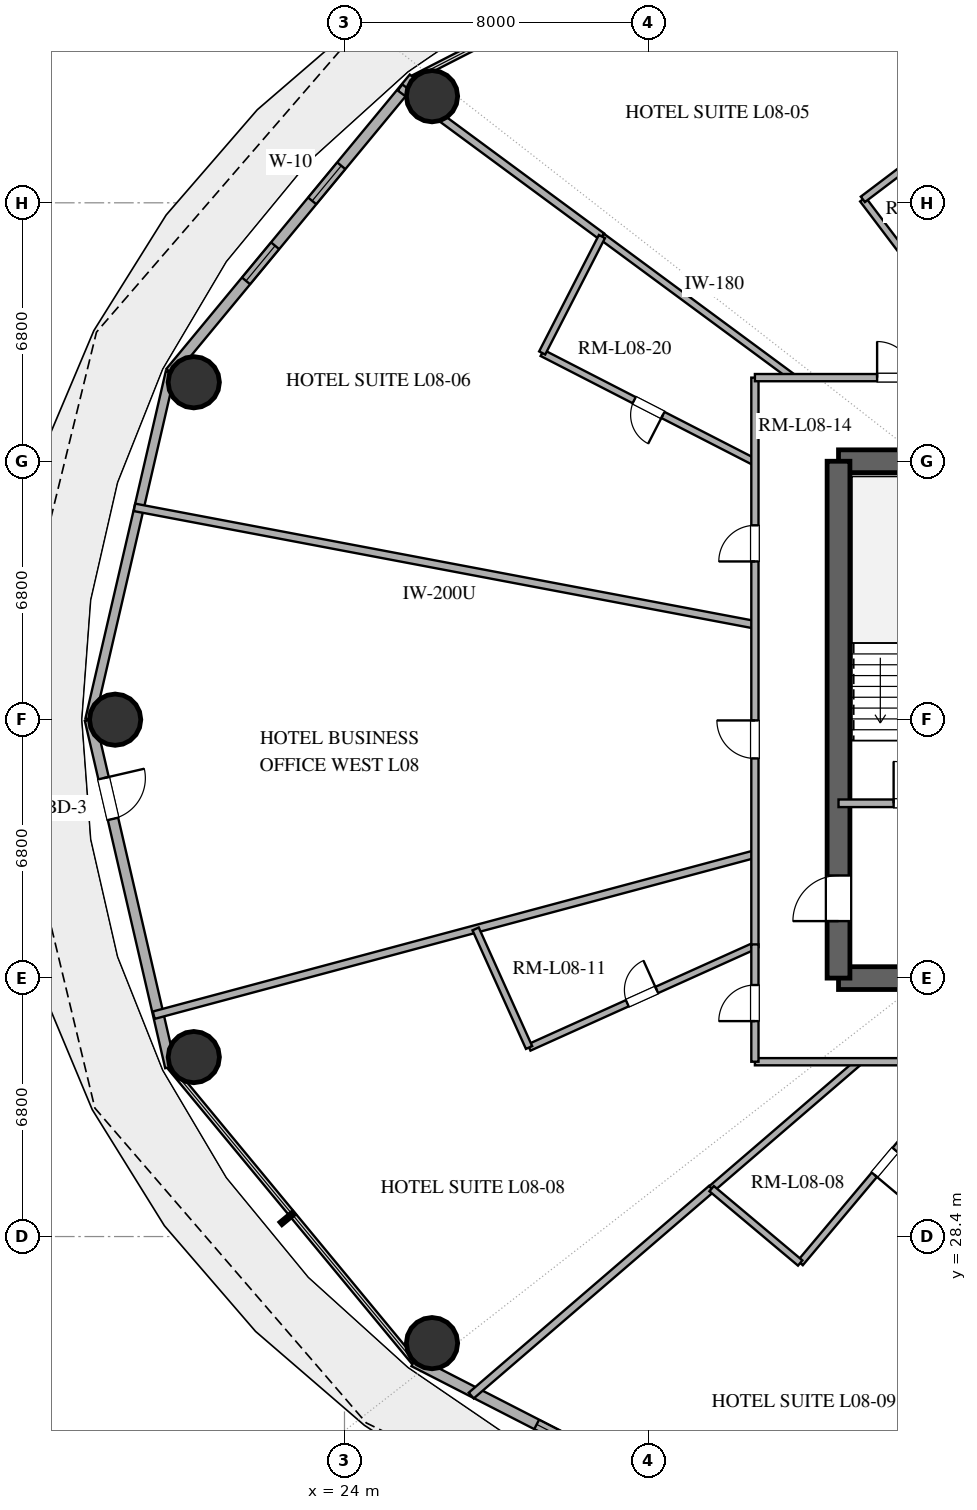
"""IFC4 building model, lengths in metres.
Left out: names, types, materials, properties, quantities, classifications, styles, units other than length and angle.
Written with IfcOpenShell. Run it as: python <this file> out.ifc"""

import sys

from ifc_helpers import new_model, si_unit, direction, frame, frame_2d, origin, origin_2d, place, context, subcontext, project, spatial, rectangle, hollow_circle, extrude, element, fill, save


model = new_model("IFC4")
c1 = context("Model", 3, precision=1e-05, world=origin(), true_north=direction((0.0, 1.0)))
c2 = subcontext(c1, "Body", "Model", "MODEL_VIEW")
j1 = project(units=[si_unit("LENGTHUNIT", "METRE"), si_unit("PLANEANGLEUNIT", "RADIAN")], contexts=[c1])
p1 = place(None, origin())
s1 = spatial("IfcSite", under=j1, at=p1, CompositionType="ELEMENT")
p2 = place(p1, origin())
s2 = spatial("IfcBuilding", under=s1, at=p2, CompositionType="ELEMENT")
p3 = place(p2, frame((0.0, 0.0, 39.0)))
s3 = spatial("IfcBuildingStorey", under=s2, at=p3, CompositionType="ELEMENT", Elevation=39.0)
for number, where, z_axis, x_axis in (
    (1, (37.0, 35.2, 0.0), (0.0, 0.0, 1.0), (1.0, 0.0, 0.0)),
    (2, (37.0, 48.8, 0.0), (0.0, 0.0, 1.0), (1.0, 0.0, 0.0)),
):
    element("IfcWall", number, at=place(p3, frame(where, z_axis=z_axis, x_axis=x_axis)), inside=s3, PredefinedType="SHEAR", context=c2, shape_type="SweptSolid", body=[
        extrude(rectangle(XDim=4.0, YDim=0.6, at=frame_2d((2.0, 0.0))), origin(), (0.0, 0.0, 1.0), 3.38),
    ])
p4 = place(p3, frame((37.0, 35.2, 0.0), z_axis=(0.0, 0.0, 1.0), x_axis=(0.0, 1.0, 0.0)))
e3 = element("IfcWall", 3, at=p4, inside=s3, PredefinedType="SHEAR", context=c2, shape_type="SweptSolid", body=[
    extrude(rectangle(XDim=13.6, YDim=0.6, at=frame_2d((6.8, 0.0))), origin(), (0.0, 0.0, 1.0), 3.38),
])
p5 = place(p4, frame((1.5, 0.0, 0.0)))
e4 = element("IfcOpeningElement", 4, at=p5, cuts=e3, PredefinedType="OPENING", context=c2, shape_type="SweptSolid", body=[
    extrude(rectangle(XDim=1.2, YDim=2.15, at=frame_2d((0.6, 1.075))), frame((0.0, 0.31, 0.0), z_axis=(0.0, -1.0, 0.0), x_axis=(1.0, 0.0, 0.0)), (0.0, 0.0, 1.0), 0.62),
])
for number, where, z_axis, x_axis in (
    (5, (26.303, 58.405, 0.0), (0.0, 0.0, 1.0), (1.0, 0.0, 0.0)),
    (6, (20.034, 50.878, 0.0), (0.0, 0.0, 1.0), (1.0, 0.0, 0.0)),
    (7, (17.965, 42.0, 0.0), (0.0, 0.0, 1.0), (1.0, 0.0, 0.0)),
    (8, (20.034, 33.122, 0.0), (0.0, 0.0, 1.0), (1.0, 0.0, 0.0)),
    (9, (26.303, 25.595, 0.0), (0.0, 0.0, 1.0), (1.0, 0.0, 0.0)),
):
    element("IfcColumn", number, at=place(p3, frame(where, z_axis=z_axis, x_axis=x_axis)), inside=s3, PredefinedType="COLUMN", context=c2, shape_type="SweptSolid", body=[
        extrude(hollow_circle(Radius=0.675, WallThickness=0.036, at=origin_2d()), origin(), (0.0, 0.0, 1.0), 3.38),
    ])
p6 = place(p3, frame((25.826, 58.886, 0.0), z_axis=(0.0, 0.0, 1.0), x_axis=(-0.637296809613, -0.770618437657, 0.0)))
e10 = element("IfcWall", 10, at=p6, inside=s3, PredefinedType="SOLIDWALL", context=c2, shape_type="SweptSolid", body=[
    extrude(rectangle(XDim=10.053, YDim=0.28, at=frame_2d((5.027, 0.0))), origin(), (0.0, 0.0, 1.0), 3.38),
])
p7 = place(p6, frame((2.998, 0.0, 0.85)))
e11 = element("IfcOpeningElement", 11, at=p7, cuts=e10, PredefinedType="OPENING", context=c2, shape_type="SweptSolid", body=[
    extrude(rectangle(XDim=1.2, YDim=1.6, at=frame_2d((0.6, 0.8))), frame((0.0, 0.15, 0.0), z_axis=(0.0, -1.0, 0.0), x_axis=(1.0, 0.0, 0.0)), (0.0, 0.0, 1.0), 0.3),
])
p8 = place(p6, frame((5.73, 0.0, 0.85)))
e12 = element("IfcOpeningElement", 12, at=p8, cuts=e10, PredefinedType="OPENING", context=c2, shape_type="SweptSolid", body=[
    extrude(rectangle(XDim=1.2, YDim=1.6, at=frame_2d((0.6, 0.8))), frame((0.0, 0.15, 0.0), z_axis=(0.0, -1.0, 0.0), x_axis=(1.0, 0.0, 0.0)), (0.0, 0.0, 1.0), 0.3),
])
p9 = place(p3, frame((19.419, 51.138, 0.0), z_axis=(0.0, 0.0, 1.0), x_axis=(-0.225454452941, -0.974253709076, 0.0)))
e13 = element("IfcWall", 13, at=p9, inside=s3, PredefinedType="SOLIDWALL", context=c2, shape_type="SweptSolid", body=[
    extrude(rectangle(XDim=9.38, YDim=0.25, at=frame_2d((4.69, 0.0))), origin(), (0.0, 0.0, 1.0), 3.38),
])
p10 = place(p3, frame((17.304, 42.0, 0.0), z_axis=(0.0, 0.0, 1.0), x_axis=(0.225454452941, -0.974253709076, 0.0)))
e14 = element("IfcWall", 14, at=p10, inside=s3, PredefinedType="SOLIDWALL", context=c2, shape_type="SweptSolid", body=[
    extrude(rectangle(XDim=9.38, YDim=0.28, at=frame_2d((4.69, 0.0))), origin(), (0.0, 0.0, 1.0), 3.38),
])
p11 = place(p10, frame((1.579, 0.0, 0.0)))
e15 = element("IfcOpeningElement", 15, at=p11, cuts=e14, PredefinedType="OPENING", context=c2, shape_type="SweptSolid", body=[
    extrude(rectangle(XDim=1.1, YDim=2.25, at=frame_2d((0.55, 1.125))), frame((0.0, 0.15, 0.0), z_axis=(0.0, -1.0, 0.0), x_axis=(1.0, 0.0, 0.0)), (0.0, 0.0, 1.0), 0.3),
])
p12 = place(p3, frame((25.826, 25.114, 0.0), z_axis=(0.0, 0.0, 1.0), x_axis=(0.889853976658, -0.456245438581, 0.0)))
e16 = element("IfcWall", 16, at=p12, inside=s3, PredefinedType="SOLIDWALL", context=c2, shape_type="SweptSolid", body=[
    extrude(rectangle(XDim=11.346, YDim=0.28, at=frame_2d((5.673, 0.0))), origin(), (0.0, 0.0, 1.0), 3.38),
])
p13 = place(p12, frame((3.632, 0.0, 0.85)))
e17 = element("IfcOpeningElement", 17, at=p13, cuts=e16, PredefinedType="OPENING", context=c2, shape_type="SweptSolid", body=[
    extrude(rectangle(XDim=1.5, YDim=2.0, at=frame_2d((0.75, 1.0))), frame((0.0, 0.15, 0.0), z_axis=(0.0, -1.0, 0.0), x_axis=(1.0, 0.0, 0.0)), (0.0, 0.0, 1.0), 0.3),
])
p14 = place(p12, frame((6.761, 0.0, 0.85)))
e18 = element("IfcOpeningElement", 18, at=p14, cuts=e16, PredefinedType="OPENING", context=c2, shape_type="SweptSolid", body=[
    extrude(rectangle(XDim=1.5, YDim=2.0, at=frame_2d((0.75, 1.0))), frame((0.0, 0.15, 0.0), z_axis=(0.0, -1.0, 0.0), x_axis=(1.0, 0.0, 0.0)), (0.0, 0.0, 1.0), 0.3),
])
p15 = place(p3, frame((37.0, 39.8, 0.0), z_axis=(0.0, 0.0, 1.0), x_axis=(1.0, 0.0, 0.0)))
e19 = element("IfcWall", 19, at=p15, inside=s3, PredefinedType="SOLIDWALL", context=c2, shape_type="SweptSolid", body=[
    extrude(rectangle(XDim=4.0, YDim=0.2, at=frame_2d((2.0, 0.0))), origin(), (0.0, 0.0, 1.0), 2.74),
])
p16 = place(p15, frame((1.45, 0.0, 0.0)))
e20 = element("IfcOpeningElement", 20, at=p16, cuts=e19, PredefinedType="OPENING", context=c2, shape_type="SweptSolid", body=[
    extrude(rectangle(XDim=1.1, YDim=2.15, at=frame_2d((0.55, 1.075))), frame((0.0, 0.11, 0.0), z_axis=(0.0, -1.0, 0.0), x_axis=(1.0, 0.0, 0.0)), (0.0, 0.0, 1.0), 0.22),
])
p17 = place(p3, frame((34.8, 44.498, 0.0), z_axis=(0.0, 0.0, 1.0), x_axis=(-0.982565603173, 0.185916205484, 0.0)))
e21 = element("IfcWall", 21, at=p17, inside=s3, PredefinedType="PARTITIONING", context=c2, shape_type="SweptSolid", body=[
    extrude(rectangle(XDim=16.616, YDim=0.2, at=frame_2d((8.308, 0.0))), origin(), (0.0, 0.0, 1.0), 2.74),
])
p18 = place(p3, frame((34.8, 38.463, 0.0), z_axis=(0.0, 0.0, 1.0), x_axis=(-0.965922233104, -0.258832454679, 0.0)))
e22 = element("IfcWall", 22, at=p18, inside=s3, PredefinedType="PARTITIONING", context=c2, shape_type="SweptSolid", body=[
    extrude(rectangle(XDim=16.377, YDim=0.2, at=frame_2d((8.189, 0.0))), origin(), (0.0, 0.0, 1.0), 2.74),
])
p19 = place(p3, frame((27.334, 24.216, 0.0), z_axis=(0.0, 0.0, 1.0), x_axis=(0.757966817992, 0.652293111127, 0.0)))
e23 = element("IfcWall", 23, at=p19, inside=s3, PredefinedType="PARTITIONING", context=c2, shape_type="SweptSolid", body=[
    extrude(rectangle(XDim=8.347, YDim=0.2, at=frame_2d((4.174, 0.0))), origin(), (0.0, 0.0, 1.0), 2.74),
])
p20 = place(p3, frame((44.073, 33.0, 0.0), z_axis=(0.0, 0.0, 1.0), x_axis=(-0.399884283786, -0.916565632991, 0.0)))
e24 = element("IfcWall", 24, at=p20, inside=s3, PredefinedType="PARTITIONING", context=c2, shape_type="SweptSolid", body=[
    extrude(rectangle(XDim=14.749, YDim=0.2, at=frame_2d((7.375, 0.0))), origin(), (0.0, 0.0, 1.0), 2.74),
])
p21 = place(p3, frame((43.243, 51.0, 0.0), z_axis=(0.0, 0.0, 1.0), x_axis=(-0.467270516294, 0.884114395654, 0.0)))
e25 = element("IfcWall", 25, at=p21, inside=s3, PredefinedType="PARTITIONING", context=c2, shape_type="SweptSolid", body=[
    extrude(rectangle(XDim=14.96, YDim=0.2, at=frame_2d((7.48, 0.0))), origin(), (0.0, 0.0, 1.0), 2.74),
])
p22 = place(p3, frame((40.44, 33.0, 0.0), z_axis=(0.0, 0.0, 1.0), x_axis=(-0.643154836645, -0.765736153058, 0.0)))
e26 = element("IfcWall", 26, at=p22, inside=s3, PredefinedType="PLUMBINGWALL", context=c2, shape_type="SweptSolid", body=[
    extrude(rectangle(XDim=6.917, YDim=0.18, at=frame_2d((3.458, 0.0))), origin(), (0.0, 0.0, 1.0), 2.74),
])
p23 = place(p22, frame((3.034, 0.0, 0.0)))
e27 = element("IfcOpeningElement", 27, at=p23, cuts=e26, PredefinedType="OPENING", context=c2, shape_type="SweptSolid", body=[
    extrude(rectangle(XDim=0.85, YDim=2.1, at=frame_2d((0.425, 1.05))), frame((0.0, 0.1, 0.0), z_axis=(0.0, -1.0, 0.0), x_axis=(1.0, 0.0, 0.0)), (0.0, 0.0, 1.0), 0.2),
])
p24 = place(p3, frame((25.462, 58.634, 0.0), z_axis=(0.0, 0.0, 1.0), x_axis=(0.804616980297, -0.593794168898, 0.0)))
e28 = element("IfcWall", 28, at=p24, inside=s3, PredefinedType="PARTITIONING", context=c2, shape_type="SweptSolid", body=[
    extrude(rectangle(XDim=6.603, YDim=0.2, at=frame_2d((3.302, 0.0))), origin(), (0.0, 0.0, 1.0), 2.74),
])
p25 = place(p3, frame((28.857, 33.374, 0.0), z_axis=(0.0, 0.0, 1.0), x_axis=(0.911702033518, 0.410852044025, 0.0)))
e29 = element("IfcWall", 29, at=p25, inside=s3, PredefinedType="PLUMBINGWALL", context=c2, shape_type="SweptSolid", body=[
    extrude(rectangle(XDim=6.519, YDim=0.18, at=frame_2d((3.259, 0.0))), origin(), (0.0, 0.0, 1.0), 2.74),
])
p26 = place(p25, frame((2.834, 0.0, 0.0)))
e30 = element("IfcOpeningElement", 30, at=p26, cuts=e29, PredefinedType="OPENING", context=c2, shape_type="SweptSolid", body=[
    extrude(rectangle(XDim=0.85, YDim=2.1, at=frame_2d((0.425, 1.05))), frame((0.0, 0.1, 0.0), z_axis=(0.0, -1.0, 0.0), x_axis=(1.0, 0.0, 0.0)), (0.0, 0.0, 1.0), 0.2),
])
p27 = place(p3, frame((34.8, 48.776, 0.0), z_axis=(0.0, 0.0, 1.0), x_axis=(-0.889651376734, 0.456640370395, 0.0)))
e31 = element("IfcWall", 31, at=p27, inside=s3, PredefinedType="PLUMBINGWALL", context=c2, shape_type="SweptSolid", body=[
    extrude(rectangle(XDim=6.292, YDim=0.18, at=frame_2d((3.146, 0.0))), origin(), (0.0, 0.0, 1.0), 2.74),
])
p28 = place(p27, frame((2.721, 0.0, 0.0)))
e32 = element("IfcOpeningElement", 32, at=p28, cuts=e31, PredefinedType="OPENING", context=c2, shape_type="SweptSolid", body=[
    extrude(rectangle(XDim=0.85, YDim=2.1, at=frame_2d((0.425, 1.05))), frame((0.0, 0.1, 0.0), z_axis=(0.0, -1.0, 0.0), x_axis=(1.0, 0.0, 0.0)), (0.0, 0.0, 1.0), 0.2),
])
p29 = place(p3, frame((30.775, 54.713, 0.0), z_axis=(0.0, 0.0, 1.0), x_axis=(0.804582519588, -0.593840861825, 0.0)))
e33 = element("IfcWall", 33, at=p29, inside=s3, PredefinedType="PLUMBINGWALL", context=c2, shape_type="SweptSolid", body=[
    extrude(rectangle(XDim=6.252, YDim=0.18, at=frame_2d((3.126, 0.0))), origin(), (0.0, 0.0, 1.0), 2.74),
])
p30 = place(p3, frame((34.8, 36.017, 0.0), z_axis=(0.0, 0.0, 1.0), x_axis=(0.0, 1.0, 0.0)))
e34 = element("IfcWall", 34, at=p30, inside=s3, PredefinedType="PARTITIONING", context=c2, shape_type="SweptSolid", body=[
    extrude(rectangle(XDim=14.983, YDim=0.19, at=frame_2d((7.492, 0.0))), origin(), (0.0, 0.0, 1.0), 2.74),
])
p31 = place(p30, frame((4.963, 0.0, 0.0)))
e35 = element("IfcOpeningElement", 35, at=p31, cuts=e34, PredefinedType="OPENING", context=c2, shape_type="SweptSolid", body=[
    extrude(rectangle(XDim=1.0, YDim=2.2, at=frame_2d((0.5, 1.1))), frame((0.0, 0.105, 0.0), z_axis=(0.0, -1.0, 0.0), x_axis=(1.0, 0.0, 0.0)), (0.0, 0.0, 1.0), 0.21),
])
p32 = place(p30, frame((10.146, 0.0, 0.0)))
e36 = element("IfcOpeningElement", 36, at=p32, cuts=e34, PredefinedType="OPENING", context=c2, shape_type="SweptSolid", body=[
    extrude(rectangle(XDim=0.95, YDim=2.15, at=frame_2d((0.475, 1.075))), frame((0.0, 0.105, 0.0), z_axis=(0.0, -1.0, 0.0), x_axis=(1.0, 0.0, 0.0)), (0.0, 0.0, 1.0), 0.21),
])
p33 = place(p3, frame((37.64, 55.691, 0.0), z_axis=(0.0, 0.0, 1.0), x_axis=(0.603401299207, -0.797437691682, 0.0)))
e37 = element("IfcWall", 37, at=p33, inside=s3, PredefinedType="PLUMBINGWALL", context=c2, shape_type="SweptSolid", body=[
    extrude(rectangle(XDim=5.882, YDim=0.18, at=frame_2d((2.941, 0.0))), origin(), (0.0, 0.0, 1.0), 2.74),
])
p34 = place(p33, frame((2.516, 0.0, 0.0)))
e38 = element("IfcOpeningElement", 38, at=p34, cuts=e37, PredefinedType="OPENING", context=c2, shape_type="SweptSolid", body=[
    extrude(rectangle(XDim=0.85, YDim=2.1, at=frame_2d((0.425, 1.05))), frame((0.0, 0.1, 0.0), z_axis=(0.0, -1.0, 0.0), x_axis=(1.0, 0.0, 0.0)), (0.0, 0.0, 1.0), 0.2),
])
p35 = place(p3, frame((34.8, 51.0, 0.0), z_axis=(0.0, 0.0, 1.0), x_axis=(1.0, 0.0, 0.0)))
e39 = element("IfcWall", 39, at=p35, inside=s3, PredefinedType="PARTITIONING", context=c2, shape_type="SweptSolid", body=[
    extrude(rectangle(XDim=8.479, YDim=0.19, at=frame_2d((4.24, 0.0))), origin(), (0.0, 0.0, 1.0), 2.74),
])
p36 = place(p35, frame((3.216, 0.0, 0.0)))
e40 = element("IfcOpeningElement", 40, at=p36, cuts=e39, PredefinedType="OPENING", context=c2, shape_type="SweptSolid", body=[
    extrude(rectangle(XDim=0.95, YDim=2.15, at=frame_2d((0.475, 1.075))), frame((0.0, 0.105, 0.0), z_axis=(0.0, -1.0, 0.0), x_axis=(1.0, 0.0, 0.0)), (0.0, 0.0, 1.0), 0.21),
])
p37 = place(p3, frame((33.661, 29.661, 0.0), z_axis=(0.0, 0.0, 1.0), x_axis=(0.757969199921, 0.652290343307, 0.0)))
e41 = element("IfcWall", 41, at=p37, inside=s3, PredefinedType="PLUMBINGWALL", context=c2, shape_type="SweptSolid", body=[
    extrude(rectangle(XDim=5.119, YDim=0.18, at=frame_2d((2.56, 0.0))), origin(), (0.0, 0.0, 1.0), 2.74),
])
p38 = place(p3, frame((44.108, 33.0, 0.0), z_axis=(0.0, 0.0, 1.0), x_axis=(-1.0, 0.0, 0.0)))
e42 = element("IfcWall", 42, at=p38, inside=s3, PredefinedType="PARTITIONING", context=c2, shape_type="SweptSolid", body=[
    extrude(rectangle(XDim=9.308, YDim=0.19, at=frame_2d((4.654, 0.0))), origin(), (0.0, 0.0, 1.0), 2.74),
])
p39 = place(p38, frame((1.38, 0.0, 0.0)))
e43 = element("IfcOpeningElement", 43, at=p39, cuts=e42, PredefinedType="OPENING", context=c2, shape_type="SweptSolid", body=[
    extrude(rectangle(XDim=0.95, YDim=2.15, at=frame_2d((0.475, 1.075))), frame((0.0, 0.105, 0.0), z_axis=(0.0, -1.0, 0.0), x_axis=(1.0, 0.0, 0.0)), (0.0, 0.0, 1.0), 0.21),
])
p40 = place(p3, frame((29.202, 51.649, 0.0), z_axis=(0.0, 0.0, 1.0), x_axis=(0.456659133546, 0.889641745732, 0.0)))
e44 = element("IfcWall", 44, at=p40, inside=s3, PredefinedType="PLUMBINGWALL", context=c2, shape_type="SweptSolid", body=[
    extrude(rectangle(XDim=3.444, YDim=0.18, at=frame_2d((1.722, 0.0))), origin(), (0.0, 0.0, 1.0), 2.74),
])
p41 = place(p3, frame((27.451, 36.494, 0.0), z_axis=(0.0, 0.0, 1.0), x_axis=(0.410839223928, -0.911707810695, 0.0)))
e45 = element("IfcWall", 45, at=p41, inside=s3, PredefinedType="PLUMBINGWALL", context=c2, shape_type="SweptSolid", body=[
    extrude(rectangle(XDim=3.422, YDim=0.18, at=frame_2d((1.711, 0.0))), origin(), (0.0, 0.0, 1.0), 2.74),
])
p42 = place(p3, frame((34.8, 33.0, 0.0), z_axis=(0.0, 0.0, 1.0), x_axis=(0.0, 1.0, 0.0)))
e46 = element("IfcWall", 46, at=p42, inside=s3, PredefinedType="PARTITIONING", context=c2, shape_type="SweptSolid", body=[
    extrude(rectangle(XDim=3.087, YDim=0.19, at=frame_2d((1.543, 0.0))), origin(), (0.0, 0.0, 1.0), 2.74),
])
p43 = place(p42, frame((1.069, 0.0, 0.0)))
e47 = element("IfcOpeningElement", 47, at=p43, cuts=e46, PredefinedType="OPENING", context=c2, shape_type="SweptSolid", body=[
    extrude(rectangle(XDim=0.95, YDim=2.15, at=frame_2d((0.475, 1.075))), frame((0.0, 0.105, 0.0), z_axis=(0.0, -1.0, 0.0), x_axis=(1.0, 0.0, 0.0)), (0.0, 0.0, 1.0), 0.21),
])
p44 = place(p3, frame((35.992, 27.703, 0.0), z_axis=(0.0, 0.0, 1.0), x_axis=(-0.765736471754, 0.643154457208, 0.0)))
e48 = element("IfcWall", 48, at=p44, inside=s3, PredefinedType="PLUMBINGWALL", context=c2, shape_type="SweptSolid", body=[
    extrude(rectangle(XDim=3.043, YDim=0.18, at=frame_2d((1.521, 0.0))), origin(), (0.0, 0.0, 1.0), 2.74),
])
p45 = place(p3, frame((39.872, 57.379, 0.0), z_axis=(0.0, 0.0, 1.0), x_axis=(-0.797438154909, -0.603400687019, 0.0)))
e49 = element("IfcWall", 49, at=p45, inside=s3, PredefinedType="PLUMBINGWALL", context=c2, shape_type="SweptSolid", body=[
    extrude(rectangle(XDim=2.798, YDim=0.18, at=frame_2d((1.399, 0.0))), origin(), (0.0, 0.0, 1.0), 2.74),
])
p46 = place(p7, origin())
e50 = element("IfcWindow", 50, at=p46, inside=s3, PartitioningType="SINGLE_PANEL", PredefinedType="WINDOW", context=c2, shape_type="SweptSolid", body=[
    extrude(rectangle(XDim=1.2, YDim=1.6, at=frame_2d((0.6, 0.8))), frame((0.0, 0.03, 0.0), z_axis=(0.0, -1.0, 0.0), x_axis=(1.0, 0.0, 0.0)), (0.0, 0.0, 1.0), 0.06),
])
fill(e11, e50)
p47 = place(p8, origin())
e51 = element("IfcWindow", 51, at=p47, inside=s3, PartitioningType="SINGLE_PANEL", PredefinedType="WINDOW", context=c2, shape_type="SweptSolid", body=[
    extrude(rectangle(XDim=1.2, YDim=1.6, at=frame_2d((0.6, 0.8))), frame((0.0, 0.03, 0.0), z_axis=(0.0, -1.0, 0.0), x_axis=(1.0, 0.0, 0.0)), (0.0, 0.0, 1.0), 0.06),
])
fill(e12, e51)
p48 = place(p11, origin())
e52 = element("IfcDoor", 52, at=p48, inside=s3, OperationType="SINGLE_SWING_LEFT", PredefinedType="DOOR", context=c2, shape_type="SweptSolid", body=[
    extrude(rectangle(XDim=1.1, YDim=2.25, at=frame_2d((0.55, 1.125))), frame((0.0, 0.025, 0.0), z_axis=(0.0, -1.0, 0.0), x_axis=(1.0, 0.0, 0.0)), (0.0, 0.0, 1.0), 0.05),
])
fill(e15, e52)
p49 = place(p13, origin())
e53 = element("IfcWindow", 53, at=p49, inside=s3, PartitioningType="SINGLE_PANEL", PredefinedType="WINDOW", context=c2, shape_type="SweptSolid", body=[
    extrude(rectangle(XDim=1.5, YDim=2.0, at=frame_2d((0.75, 1.0))), frame((0.0, 0.03, 0.0), z_axis=(0.0, -1.0, 0.0), x_axis=(1.0, 0.0, 0.0)), (0.0, 0.0, 1.0), 0.06),
])
fill(e17, e53)
p50 = place(p5, origin())
e54 = element("IfcDoor", 54, at=p50, inside=s3, OperationType="SINGLE_SWING_LEFT", PredefinedType="DOOR", context=c2, shape_type="SweptSolid", body=[
    extrude(rectangle(XDim=1.2, YDim=2.15, at=frame_2d((0.6, 1.075))), frame((0.0, 0.025, 0.0), z_axis=(0.0, -1.0, 0.0), x_axis=(1.0, 0.0, 0.0)), (0.0, 0.0, 1.0), 0.05),
])
fill(e4, e54)
p51 = place(p16, origin())
e55 = element("IfcDoor", 55, at=p51, inside=s3, OperationType="SINGLE_SWING_LEFT", PredefinedType="DOOR", context=c2, shape_type="SweptSolid", body=[
    extrude(rectangle(XDim=1.1, YDim=2.15, at=frame_2d((0.55, 1.075))), frame((0.0, 0.025, 0.0), z_axis=(0.0, -1.0, 0.0), x_axis=(1.0, 0.0, 0.0)), (0.0, 0.0, 1.0), 0.05),
])
fill(e20, e55)
p52 = place(p23, origin())
e56 = element("IfcDoor", 56, at=p52, inside=s3, OperationType="SINGLE_SWING_RIGHT", PredefinedType="DOOR", context=c2, shape_type="SweptSolid", body=[
    extrude(rectangle(XDim=0.85, YDim=2.1, at=frame_2d((0.425, 1.05))), frame((0.0, 0.025, 0.0), z_axis=(0.0, -1.0, 0.0), x_axis=(1.0, 0.0, 0.0)), (0.0, 0.0, 1.0), 0.05),
])
fill(e27, e56)
p53 = place(p26, origin())
e57 = element("IfcDoor", 57, at=p53, inside=s3, OperationType="SINGLE_SWING_RIGHT", PredefinedType="DOOR", context=c2, shape_type="SweptSolid", body=[
    extrude(rectangle(XDim=0.85, YDim=2.1, at=frame_2d((0.425, 1.05))), frame((0.0, 0.025, 0.0), z_axis=(0.0, -1.0, 0.0), x_axis=(1.0, 0.0, 0.0)), (0.0, 0.0, 1.0), 0.05),
])
fill(e30, e57)
p54 = place(p28, origin())
e58 = element("IfcDoor", 58, at=p54, inside=s3, OperationType="SINGLE_SWING_LEFT", PredefinedType="DOOR", context=c2, shape_type="SweptSolid", body=[
    extrude(rectangle(XDim=0.85, YDim=2.1, at=frame_2d((0.425, 1.05))), frame((0.0, 0.025, 0.0), z_axis=(0.0, -1.0, 0.0), x_axis=(1.0, 0.0, 0.0)), (0.0, 0.0, 1.0), 0.05),
])
fill(e32, e58)
p55 = place(p31, origin())
e59 = element("IfcDoor", 59, at=p55, inside=s3, OperationType="SINGLE_SWING_RIGHT", PredefinedType="DOOR", context=c2, shape_type="SweptSolid", body=[
    extrude(rectangle(XDim=1.0, YDim=2.2, at=frame_2d((0.5, 1.1))), frame((0.0, 0.025, 0.0), z_axis=(0.0, -1.0, 0.0), x_axis=(1.0, 0.0, 0.0)), (0.0, 0.0, 1.0), 0.05),
])
fill(e35, e59)
p56 = place(p32, origin())
e60 = element("IfcDoor", 60, at=p56, inside=s3, OperationType="SINGLE_SWING_LEFT", PredefinedType="DOOR", context=c2, shape_type="SweptSolid", body=[
    extrude(rectangle(XDim=0.95, YDim=2.15, at=frame_2d((0.475, 1.075))), frame((0.0, 0.025, 0.0), z_axis=(0.0, -1.0, 0.0), x_axis=(1.0, 0.0, 0.0)), (0.0, 0.0, 1.0), 0.05),
])
fill(e36, e60)
p57 = place(p36, origin())
e61 = element("IfcDoor", 61, at=p57, inside=s3, OperationType="SINGLE_SWING_LEFT", PredefinedType="DOOR", context=c2, shape_type="SweptSolid", body=[
    extrude(rectangle(XDim=0.95, YDim=2.15, at=frame_2d((0.475, 1.075))), frame((0.0, 0.025, 0.0), z_axis=(0.0, -1.0, 0.0), x_axis=(1.0, 0.0, 0.0)), (0.0, 0.0, 1.0), 0.05),
])
fill(e40, e61)
p58 = place(p43, origin())
e62 = element("IfcDoor", 62, at=p58, inside=s3, OperationType="SINGLE_SWING_LEFT", PredefinedType="DOOR", context=c2, shape_type="SweptSolid", body=[
    extrude(rectangle(XDim=0.95, YDim=2.15, at=frame_2d((0.475, 1.075))), frame((0.0, 0.025, 0.0), z_axis=(0.0, -1.0, 0.0), x_axis=(1.0, 0.0, 0.0)), (0.0, 0.0, 1.0), 0.05),
])
fill(e47, e62)
save(model, sys.argv[1])
